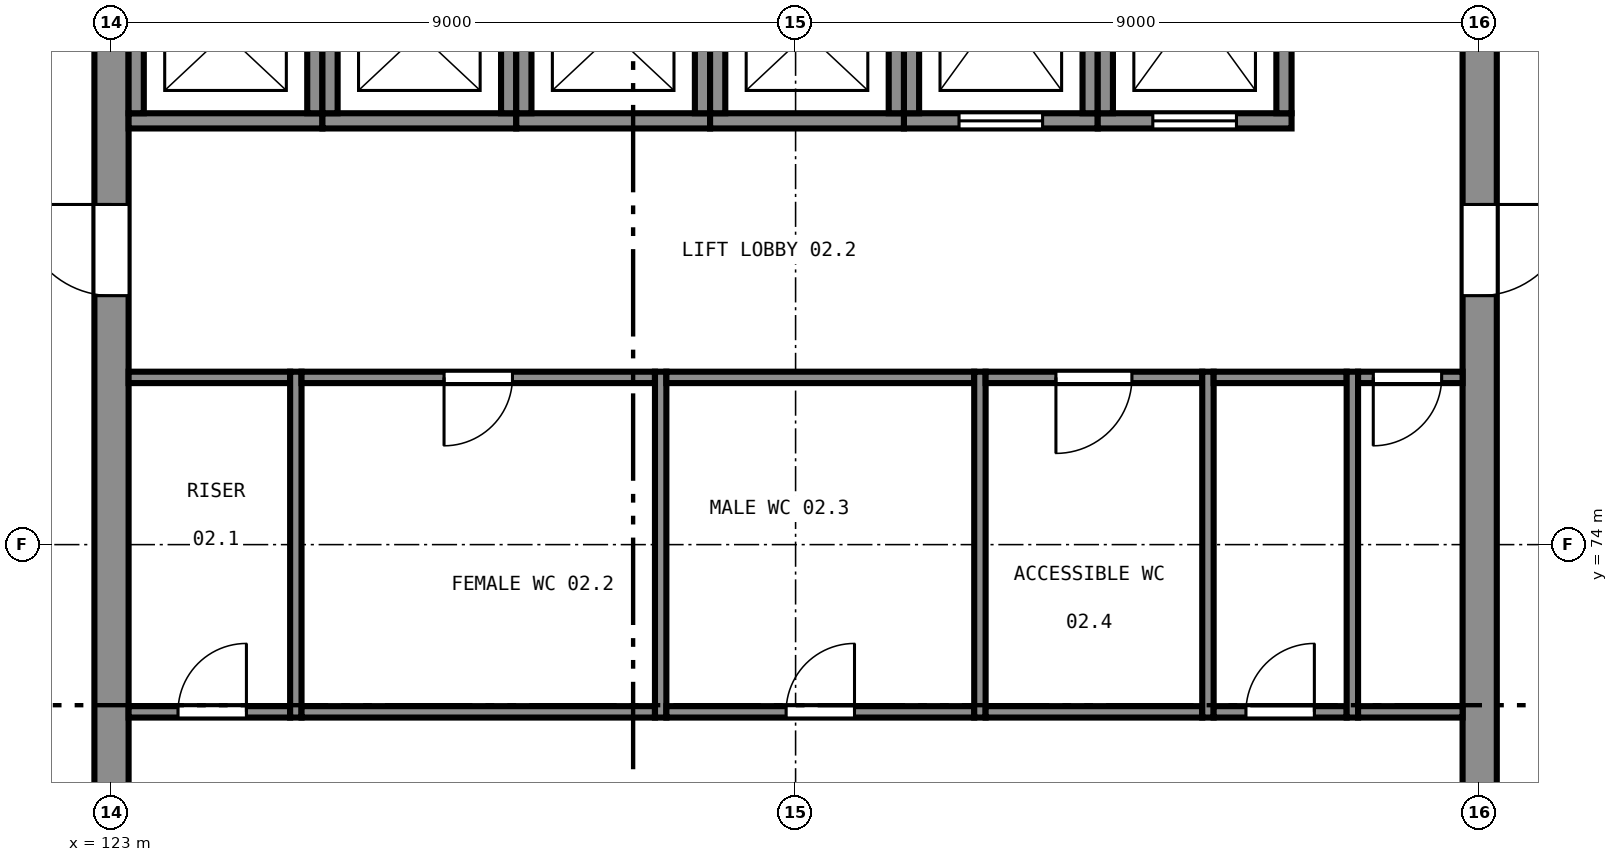
"""IFC4 building model, lengths in metres.
Left out: names, types, materials, properties, quantities, classifications, styles, units other than length and angle.
Written with IfcOpenShell. Run it as: python <this file> out.ifc"""

import sys

from ifc_helpers import new_model, si_unit, direction, frame, frame_2d, origin, place, context, subcontext, project, spatial, rectangle, extrude, element, fill, save


model = new_model("IFC4")
c1 = context("Model", 3, precision=1e-05, world=origin(), true_north=direction((0.0, 1.0)))
c2 = subcontext(c1, "Body", "Model", "MODEL_VIEW")
j1 = project(units=[si_unit("LENGTHUNIT", "METRE"), si_unit("PLANEANGLEUNIT", "RADIAN")], contexts=[c1])
p1 = place(None, origin())
s1 = spatial("IfcSite", under=j1, at=p1, CompositionType="ELEMENT")
p2 = place(p1, origin())
s2 = spatial("IfcBuilding", under=s1, at=p2, CompositionType="ELEMENT")
p3 = place(p2, frame((0.0, 0.0, 9.5)))
s3 = spatial("IfcBuildingStorey", under=s2, at=p3, CompositionType="ELEMENT", Elevation=9.5)
p4 = place(p3, frame((141.0, 65.225, 0.0), z_axis=(0.0, 0.0, 1.0), x_axis=(0.0, 1.0, 0.0)))
e1 = element("IfcWall", 1, at=p4, inside=s3, PredefinedType="SHEAR", context=c2, shape_type="SweptSolid", body=[
    extrude(rectangle(XDim=17.55, YDim=0.45, at=frame_2d((8.775, 0.0))), origin(), (0.0, 0.0, 1.0), 4.0),
])
p5 = place(p4, frame((4.3, 0.0, 0.0)))
e2 = element("IfcOpeningElement", 2, at=p5, cuts=e1, PredefinedType="OPENING", context=c2, shape_type="SweptSolid", body=[
    extrude(rectangle(XDim=1.2, YDim=2.1, at=frame_2d((0.6, 1.05))), frame((0.0, 0.235, 0.0), z_axis=(0.0, -1.0, 0.0), x_axis=(1.0, 0.0, 0.0)), (0.0, 0.0, 1.0), 0.47),
])
p6 = place(p4, frame((12.05, 0.0, 0.0)))
e3 = element("IfcOpeningElement", 3, at=p6, cuts=e1, PredefinedType="OPENING", context=c2, shape_type="SweptSolid", body=[
    extrude(rectangle(XDim=1.2, YDim=2.1, at=frame_2d((0.6, 1.05))), frame((0.0, 0.235, 0.0), z_axis=(0.0, -1.0, 0.0), x_axis=(1.0, 0.0, 0.0)), (0.0, 0.0, 1.0), 0.47),
])
p7 = place(p3, frame((123.0, 82.775, 0.0), z_axis=(0.0, 0.0, 1.0), x_axis=(0.0, -1.0, 0.0)))
e4 = element("IfcWall", 4, at=p7, inside=s3, PredefinedType="SHEAR", context=c2, shape_type="SweptSolid", body=[
    extrude(rectangle(XDim=17.55, YDim=0.45, at=frame_2d((8.775, 0.0))), origin(), (0.0, 0.0, 1.0), 4.0),
])
p8 = place(p7, frame((12.05, 0.0, 0.0)))
e5 = element("IfcOpeningElement", 5, at=p8, cuts=e4, PredefinedType="OPENING", context=c2, shape_type="SweptSolid", body=[
    extrude(rectangle(XDim=1.2, YDim=2.1, at=frame_2d((0.6, 1.05))), frame((0.0, 0.235, 0.0), z_axis=(0.0, -1.0, 0.0), x_axis=(1.0, 0.0, 0.0)), (0.0, 0.0, 1.0), 0.47),
])
p9 = place(p7, frame((4.3, 0.0, 0.0)))
e6 = element("IfcOpeningElement", 6, at=p9, cuts=e4, PredefinedType="OPENING", context=c2, shape_type="SweptSolid", body=[
    extrude(rectangle(XDim=1.2, YDim=2.1, at=frame_2d((0.6, 1.05))), frame((0.0, 0.235, 0.0), z_axis=(0.0, -1.0, 0.0), x_axis=(1.0, 0.0, 0.0)), (0.0, 0.0, 1.0), 0.47),
])
p10 = place(p3, frame((123.225, 79.575, 0.0), z_axis=(0.0, 0.0, 1.0), x_axis=(1.0, 0.0, 0.0)))
e7 = element("IfcWall", 7, at=p10, inside=s3, PredefinedType="SHEAR", context=c2, shape_type="SweptSolid", body=[
    extrude(rectangle(XDim=2.55, YDim=0.2, at=frame_2d((1.275, 0.0))), origin(), (0.0, 0.0, 1.0), 4.0),
])
for number, where, z_axis, x_axis in (
    (8, (125.675, 79.675, 0.0), (0.0, 0.0, 1.0), (0.0, 1.0, 0.0)),
    (9, (123.325, 81.775, 0.0), (0.0, 0.0, 1.0), (0.0, -1.0, 0.0)),
):
    element("IfcWall", number, at=place(p3, frame(where, z_axis=z_axis, x_axis=x_axis)), inside=s3, PredefinedType="SHEAR", context=c2, shape_type="SweptSolid", body=[
        extrude(rectangle(XDim=2.1, YDim=0.2, at=frame_2d((1.05, 0.0))), origin(), (0.0, 0.0, 1.0), 4.0),
    ])
p11 = place(p3, frame((125.775, 79.575, 0.0), z_axis=(0.0, 0.0, 1.0), x_axis=(1.0, 0.0, 0.0)))
e10 = element("IfcWall", 10, at=p11, inside=s3, PredefinedType="SHEAR", context=c2, shape_type="SweptSolid", body=[
    extrude(rectangle(XDim=2.55, YDim=0.2, at=frame_2d((1.275, 0.0))), origin(), (0.0, 0.0, 1.0), 4.0),
])
for number, where, z_axis, x_axis in (
    (11, (128.225, 79.675, 0.0), (0.0, 0.0, 1.0), (0.0, 1.0, 0.0)),
    (12, (125.875, 81.775, 0.0), (0.0, 0.0, 1.0), (0.0, -1.0, 0.0)),
):
    element("IfcWall", number, at=place(p3, frame(where, z_axis=z_axis, x_axis=x_axis)), inside=s3, PredefinedType="SHEAR", context=c2, shape_type="SweptSolid", body=[
        extrude(rectangle(XDim=2.1, YDim=0.2, at=frame_2d((1.05, 0.0))), origin(), (0.0, 0.0, 1.0), 4.0),
    ])
p12 = place(p3, frame((128.325, 79.575, 0.0), z_axis=(0.0, 0.0, 1.0), x_axis=(1.0, 0.0, 0.0)))
e13 = element("IfcWall", 13, at=p12, inside=s3, PredefinedType="SHEAR", context=c2, shape_type="SweptSolid", body=[
    extrude(rectangle(XDim=2.55, YDim=0.2, at=frame_2d((1.275, 0.0))), origin(), (0.0, 0.0, 1.0), 4.0),
])
for number, where, z_axis, x_axis in (
    (14, (130.775, 79.675, 0.0), (0.0, 0.0, 1.0), (0.0, 1.0, 0.0)),
    (15, (128.425, 81.775, 0.0), (0.0, 0.0, 1.0), (0.0, -1.0, 0.0)),
):
    element("IfcWall", number, at=place(p3, frame(where, z_axis=z_axis, x_axis=x_axis)), inside=s3, PredefinedType="SHEAR", context=c2, shape_type="SweptSolid", body=[
        extrude(rectangle(XDim=2.1, YDim=0.2, at=frame_2d((1.05, 0.0))), origin(), (0.0, 0.0, 1.0), 4.0),
    ])
p13 = place(p3, frame((130.875, 79.575, 0.0), z_axis=(0.0, 0.0, 1.0), x_axis=(1.0, 0.0, 0.0)))
e16 = element("IfcWall", 16, at=p13, inside=s3, PredefinedType="SHEAR", context=c2, shape_type="SweptSolid", body=[
    extrude(rectangle(XDim=2.55, YDim=0.2, at=frame_2d((1.275, 0.0))), origin(), (0.0, 0.0, 1.0), 4.0),
])
for number, where, z_axis, x_axis in (
    (17, (133.325, 79.675, 0.0), (0.0, 0.0, 1.0), (0.0, 1.0, 0.0)),
    (18, (130.975, 81.775, 0.0), (0.0, 0.0, 1.0), (0.0, -1.0, 0.0)),
):
    element("IfcWall", number, at=place(p3, frame(where, z_axis=z_axis, x_axis=x_axis)), inside=s3, PredefinedType="SHEAR", context=c2, shape_type="SweptSolid", body=[
        extrude(rectangle(XDim=2.1, YDim=0.2, at=frame_2d((1.05, 0.0))), origin(), (0.0, 0.0, 1.0), 4.0),
    ])
p14 = place(p3, frame((133.425, 79.575, 0.0), z_axis=(0.0, 0.0, 1.0), x_axis=(1.0, 0.0, 0.0)))
e19 = element("IfcWall", 19, at=p14, inside=s3, PredefinedType="SHEAR", context=c2, shape_type="SweptSolid", body=[
    extrude(rectangle(XDim=2.55, YDim=0.2, at=frame_2d((1.275, 0.0))), origin(), (0.0, 0.0, 1.0), 4.0),
])
p15 = place(p14, frame((0.725, 0.0, 0.0)))
e20 = element("IfcOpeningElement", 20, at=p15, cuts=e19, PredefinedType="OPENING", context=c2, shape_type="SweptSolid", body=[
    extrude(rectangle(XDim=1.1, YDim=2.1, at=frame_2d((0.55, 1.05))), frame((0.0, 0.11, 0.0), z_axis=(0.0, -1.0, 0.0), x_axis=(1.0, 0.0, 0.0)), (0.0, 0.0, 1.0), 0.22),
])
for number, where, z_axis, x_axis in (
    (21, (135.875, 79.675, 0.0), (0.0, 0.0, 1.0), (0.0, 1.0, 0.0)),
    (22, (133.525, 82.475, 0.0), (0.0, 0.0, 1.0), (0.0, -1.0, 0.0)),
):
    element("IfcWall", number, at=place(p3, frame(where, z_axis=z_axis, x_axis=x_axis)), inside=s3, PredefinedType="SHEAR", context=c2, shape_type="SweptSolid", body=[
        extrude(rectangle(XDim=2.8, YDim=0.2, at=frame_2d((1.4, 0.0))), origin(), (0.0, 0.0, 1.0), 4.0),
    ])
p16 = place(p3, frame((135.975, 79.575, 0.0), z_axis=(0.0, 0.0, 1.0), x_axis=(1.0, 0.0, 0.0)))
e23 = element("IfcWall", 23, at=p16, inside=s3, PredefinedType="SHEAR", context=c2, shape_type="SweptSolid", body=[
    extrude(rectangle(XDim=2.55, YDim=0.2, at=frame_2d((1.275, 0.0))), origin(), (0.0, 0.0, 1.0), 4.0),
])
p17 = place(p16, frame((0.725, 0.0, 0.0)))
e24 = element("IfcOpeningElement", 24, at=p17, cuts=e23, PredefinedType="OPENING", context=c2, shape_type="SweptSolid", body=[
    extrude(rectangle(XDim=1.1, YDim=2.1, at=frame_2d((0.55, 1.05))), frame((0.0, 0.11, 0.0), z_axis=(0.0, -1.0, 0.0), x_axis=(1.0, 0.0, 0.0)), (0.0, 0.0, 1.0), 0.22),
])
for number, where, z_axis, x_axis in (
    (25, (138.425, 79.675, 0.0), (0.0, 0.0, 1.0), (0.0, 1.0, 0.0)),
    (26, (136.075, 82.475, 0.0), (0.0, 0.0, 1.0), (0.0, -1.0, 0.0)),
):
    element("IfcWall", number, at=place(p3, frame(where, z_axis=z_axis, x_axis=x_axis)), inside=s3, PredefinedType="SHEAR", context=c2, shape_type="SweptSolid", body=[
        extrude(rectangle(XDim=2.8, YDim=0.2, at=frame_2d((1.4, 0.0))), origin(), (0.0, 0.0, 1.0), 4.0),
    ])
p18 = place(p3, frame((125.425, 71.725, 0.0), z_axis=(0.0, 0.0, 1.0), x_axis=(0.0, 1.0, 0.0)))
e27 = element("IfcWall", 27, at=p18, inside=s3, PredefinedType="PARTITIONING", context=c2, shape_type="SweptSolid", body=[
    extrude(rectangle(XDim=4.55, YDim=0.15, at=frame_2d((2.275, 0.0))), origin(), (0.0, 0.0, 1.0), 3.75),
])
p19 = place(p3, frame((123.225, 71.8, 0.0), z_axis=(0.0, 0.0, 1.0), x_axis=(1.0, 0.0, 0.0)))
e28 = element("IfcWall", 28, at=p19, inside=s3, PredefinedType="PARTITIONING", context=c2, shape_type="SweptSolid", body=[
    extrude(rectangle(XDim=2.125, YDim=0.15, at=frame_2d((1.062, 0.0))), origin(), (0.0, 0.0, 1.0), 3.75),
])
p20 = place(p19, frame((0.65, 0.0, 0.0)))
e29 = element("IfcOpeningElement", 29, at=p20, cuts=e28, PredefinedType="OPENING", context=c2, shape_type="SweptSolid", body=[
    extrude(rectangle(XDim=0.9, YDim=2.1, at=frame_2d((0.45, 1.05))), frame((0.0, 0.085, 0.0), z_axis=(0.0, -1.0, 0.0), x_axis=(1.0, 0.0, 0.0)), (0.0, 0.0, 1.0), 0.17),
])
p21 = place(p3, frame((123.225, 76.2, 0.0), z_axis=(0.0, 0.0, 1.0), x_axis=(1.0, 0.0, 0.0)))
e30 = element("IfcWall", 30, at=p21, inside=s3, PredefinedType="PARTITIONING", context=c2, shape_type="SweptSolid", body=[
    extrude(rectangle(XDim=2.125, YDim=0.15, at=frame_2d((1.062, 0.0))), origin(), (0.0, 0.0, 1.0), 3.75),
])
p22 = place(p3, frame((130.225, 71.725, 0.0), z_axis=(0.0, 0.0, 1.0), x_axis=(0.0, 1.0, 0.0)))
e31 = element("IfcWall", 31, at=p22, inside=s3, PredefinedType="PARTITIONING", context=c2, shape_type="SweptSolid", body=[
    extrude(rectangle(XDim=4.55, YDim=0.15, at=frame_2d((2.275, 0.0))), origin(), (0.0, 0.0, 1.0), 3.75),
])
p23 = place(p3, frame((125.5, 71.8, 0.0), z_axis=(0.0, 0.0, 1.0), x_axis=(1.0, 0.0, 0.0)))
e32 = element("IfcWall", 32, at=p23, inside=s3, PredefinedType="PARTITIONING", context=c2, shape_type="SweptSolid", body=[
    extrude(rectangle(XDim=4.65, YDim=0.15, at=frame_2d((2.325, 0.0))), origin(), (0.0, 0.0, 1.0), 3.75),
])
p24 = place(p3, frame((125.5, 76.2, 0.0), z_axis=(0.0, 0.0, 1.0), x_axis=(1.0, 0.0, 0.0)))
e33 = element("IfcWall", 33, at=p24, inside=s3, PredefinedType="PARTITIONING", context=c2, shape_type="SweptSolid", body=[
    extrude(rectangle(XDim=4.65, YDim=0.15, at=frame_2d((2.325, 0.0))), origin(), (0.0, 0.0, 1.0), 3.75),
])
p25 = place(p24, frame((1.875, 0.0, 0.0)))
e34 = element("IfcOpeningElement", 34, at=p25, cuts=e33, PredefinedType="OPENING", context=c2, shape_type="SweptSolid", body=[
    extrude(rectangle(XDim=0.9, YDim=2.1, at=frame_2d((0.45, 1.05))), frame((0.0, 0.085, 0.0), z_axis=(0.0, -1.0, 0.0), x_axis=(1.0, 0.0, 0.0)), (0.0, 0.0, 1.0), 0.17),
])
p26 = place(p3, frame((134.425, 71.725, 0.0), z_axis=(0.0, 0.0, 1.0), x_axis=(0.0, 1.0, 0.0)))
e35 = element("IfcWall", 35, at=p26, inside=s3, PredefinedType="PARTITIONING", context=c2, shape_type="SweptSolid", body=[
    extrude(rectangle(XDim=4.55, YDim=0.15, at=frame_2d((2.275, 0.0))), origin(), (0.0, 0.0, 1.0), 3.75),
])
p27 = place(p3, frame((130.3, 71.8, 0.0), z_axis=(0.0, 0.0, 1.0), x_axis=(1.0, 0.0, 0.0)))
e36 = element("IfcWall", 36, at=p27, inside=s3, PredefinedType="PARTITIONING", context=c2, shape_type="SweptSolid", body=[
    extrude(rectangle(XDim=4.05, YDim=0.15, at=frame_2d((2.025, 0.0))), origin(), (0.0, 0.0, 1.0), 3.75),
])
p28 = place(p27, frame((1.575, 0.0, 0.0)))
e37 = element("IfcOpeningElement", 37, at=p28, cuts=e36, PredefinedType="OPENING", context=c2, shape_type="SweptSolid", body=[
    extrude(rectangle(XDim=0.9, YDim=2.1, at=frame_2d((0.45, 1.05))), frame((0.0, 0.085, 0.0), z_axis=(0.0, -1.0, 0.0), x_axis=(1.0, 0.0, 0.0)), (0.0, 0.0, 1.0), 0.17),
])
p29 = place(p3, frame((130.3, 76.2, 0.0), z_axis=(0.0, 0.0, 1.0), x_axis=(1.0, 0.0, 0.0)))
e38 = element("IfcWall", 38, at=p29, inside=s3, PredefinedType="PARTITIONING", context=c2, shape_type="SweptSolid", body=[
    extrude(rectangle(XDim=4.05, YDim=0.15, at=frame_2d((2.025, 0.0))), origin(), (0.0, 0.0, 1.0), 3.75),
])
p30 = place(p3, frame((137.425, 71.725, 0.0), z_axis=(0.0, 0.0, 1.0), x_axis=(0.0, 1.0, 0.0)))
e39 = element("IfcWall", 39, at=p30, inside=s3, PredefinedType="PARTITIONING", context=c2, shape_type="SweptSolid", body=[
    extrude(rectangle(XDim=4.55, YDim=0.15, at=frame_2d((2.275, 0.0))), origin(), (0.0, 0.0, 1.0), 3.75),
])
p31 = place(p3, frame((134.5, 71.8, 0.0), z_axis=(0.0, 0.0, 1.0), x_axis=(1.0, 0.0, 0.0)))
e40 = element("IfcWall", 40, at=p31, inside=s3, PredefinedType="PARTITIONING", context=c2, shape_type="SweptSolid", body=[
    extrude(rectangle(XDim=2.85, YDim=0.15, at=frame_2d((1.425, 0.0))), origin(), (0.0, 0.0, 1.0), 3.75),
])
p32 = place(p3, frame((134.5, 76.2, 0.0), z_axis=(0.0, 0.0, 1.0), x_axis=(1.0, 0.0, 0.0)))
e41 = element("IfcWall", 41, at=p32, inside=s3, PredefinedType="PARTITIONING", context=c2, shape_type="SweptSolid", body=[
    extrude(rectangle(XDim=2.85, YDim=0.15, at=frame_2d((1.425, 0.0))), origin(), (0.0, 0.0, 1.0), 3.75),
])
p33 = place(p32, frame((0.925, 0.0, 0.0)))
e42 = element("IfcOpeningElement", 42, at=p33, cuts=e41, PredefinedType="OPENING", context=c2, shape_type="SweptSolid", body=[
    extrude(rectangle(XDim=1.0, YDim=2.1, at=frame_2d((0.5, 1.05))), frame((0.0, 0.085, 0.0), z_axis=(0.0, -1.0, 0.0), x_axis=(1.0, 0.0, 0.0)), (0.0, 0.0, 1.0), 0.17),
])
p34 = place(p3, frame((139.325, 71.725, 0.0), z_axis=(0.0, 0.0, 1.0), x_axis=(0.0, 1.0, 0.0)))
e43 = element("IfcWall", 43, at=p34, inside=s3, PredefinedType="PARTITIONING", context=c2, shape_type="SweptSolid", body=[
    extrude(rectangle(XDim=4.55, YDim=0.15, at=frame_2d((2.275, 0.0))), origin(), (0.0, 0.0, 1.0), 3.75),
])
p35 = place(p3, frame((137.5, 71.8, 0.0), z_axis=(0.0, 0.0, 1.0), x_axis=(1.0, 0.0, 0.0)))
e44 = element("IfcWall", 44, at=p35, inside=s3, PredefinedType="PARTITIONING", context=c2, shape_type="SweptSolid", body=[
    extrude(rectangle(XDim=1.75, YDim=0.15, at=frame_2d((0.875, 0.0))), origin(), (0.0, 0.0, 1.0), 3.75),
])
p36 = place(p35, frame((0.425, 0.0, 0.0)))
e45 = element("IfcOpeningElement", 45, at=p36, cuts=e44, PredefinedType="OPENING", context=c2, shape_type="SweptSolid", body=[
    extrude(rectangle(XDim=0.9, YDim=2.1, at=frame_2d((0.45, 1.05))), frame((0.0, 0.085, 0.0), z_axis=(0.0, -1.0, 0.0), x_axis=(1.0, 0.0, 0.0)), (0.0, 0.0, 1.0), 0.17),
])
p37 = place(p3, frame((137.5, 76.2, 0.0), z_axis=(0.0, 0.0, 1.0), x_axis=(1.0, 0.0, 0.0)))
e46 = element("IfcWall", 46, at=p37, inside=s3, PredefinedType="PARTITIONING", context=c2, shape_type="SweptSolid", body=[
    extrude(rectangle(XDim=1.75, YDim=0.15, at=frame_2d((0.875, 0.0))), origin(), (0.0, 0.0, 1.0), 3.75),
])
p38 = place(p3, frame((139.4, 71.8, 0.0), z_axis=(0.0, 0.0, 1.0), x_axis=(1.0, 0.0, 0.0)))
e47 = element("IfcWall", 47, at=p38, inside=s3, PredefinedType="PARTITIONING", context=c2, shape_type="SweptSolid", body=[
    extrude(rectangle(XDim=1.375, YDim=0.15, at=frame_2d((0.688, 0.0))), origin(), (0.0, 0.0, 1.0), 3.75),
])
p39 = place(p3, frame((139.4, 76.2, 0.0), z_axis=(0.0, 0.0, 1.0), x_axis=(1.0, 0.0, 0.0)))
e48 = element("IfcWall", 48, at=p39, inside=s3, PredefinedType="PARTITIONING", context=c2, shape_type="SweptSolid", body=[
    extrude(rectangle(XDim=1.375, YDim=0.15, at=frame_2d((0.688, 0.0))), origin(), (0.0, 0.0, 1.0), 3.75),
])
p40 = place(p39, frame((0.2, 0.0, 0.0)))
e49 = element("IfcOpeningElement", 49, at=p40, cuts=e48, PredefinedType="OPENING", context=c2, shape_type="SweptSolid", body=[
    extrude(rectangle(XDim=0.9, YDim=2.1, at=frame_2d((0.45, 1.05))), frame((0.0, 0.085, 0.0), z_axis=(0.0, -1.0, 0.0), x_axis=(1.0, 0.0, 0.0)), (0.0, 0.0, 1.0), 0.17),
])
p41 = place(p15, origin())
e50 = element("IfcDoor", 50, at=p41, inside=s3, OperationType="SLIDING_TO_LEFT", PredefinedType="DOOR", context=c2, shape_type="SweptSolid", body=[
    extrude(rectangle(XDim=1.1, YDim=2.1, at=frame_2d((0.55, 1.05))), frame((0.0, 0.025, 0.0), z_axis=(0.0, -1.0, 0.0), x_axis=(1.0, 0.0, 0.0)), (0.0, 0.0, 1.0), 0.05),
])
fill(e20, e50)
p42 = place(p17, origin())
e51 = element("IfcDoor", 51, at=p42, inside=s3, OperationType="SLIDING_TO_LEFT", PredefinedType="DOOR", context=c2, shape_type="SweptSolid", body=[
    extrude(rectangle(XDim=1.1, YDim=2.1, at=frame_2d((0.55, 1.05))), frame((0.0, 0.025, 0.0), z_axis=(0.0, -1.0, 0.0), x_axis=(1.0, 0.0, 0.0)), (0.0, 0.0, 1.0), 0.05),
])
fill(e24, e51)
p43 = place(p9, frame((1.2, 0.0, 0.0), z_axis=(0.0, 0.0, 1.0), x_axis=(-1.0, 0.0, 0.0)))
e52 = element("IfcDoor", 52, at=p43, inside=s3, OperationType="SINGLE_SWING_LEFT", PredefinedType="DOOR", context=c2, shape_type="SweptSolid", body=[
    extrude(rectangle(XDim=1.2, YDim=2.1, at=frame_2d((0.6, 1.05))), frame((0.0, 0.025, 0.0), z_axis=(0.0, -1.0, 0.0), x_axis=(1.0, 0.0, 0.0)), (0.0, 0.0, 1.0), 0.05),
])
fill(e6, e52)
p44 = place(p6, frame((1.2, 0.0, 0.0), z_axis=(0.0, 0.0, 1.0), x_axis=(-1.0, 0.0, 0.0)))
e53 = element("IfcDoor", 53, at=p44, inside=s3, OperationType="SINGLE_SWING_RIGHT", PredefinedType="DOOR", context=c2, shape_type="SweptSolid", body=[
    extrude(rectangle(XDim=1.2, YDim=2.1, at=frame_2d((0.6, 1.05))), frame((0.0, 0.025, 0.0), z_axis=(0.0, -1.0, 0.0), x_axis=(1.0, 0.0, 0.0)), (0.0, 0.0, 1.0), 0.05),
])
fill(e3, e53)
p45 = place(p20, origin())
e54 = element("IfcDoor", 54, at=p45, inside=s3, OperationType="SINGLE_SWING_LEFT", PredefinedType="DOOR", context=c2, shape_type="SweptSolid", body=[
    extrude(rectangle(XDim=0.9, YDim=2.1, at=frame_2d((0.45, 1.05))), frame((0.0, 0.025, 0.0), z_axis=(0.0, -1.0, 0.0), x_axis=(1.0, 0.0, 0.0)), (0.0, 0.0, 1.0), 0.05),
])
fill(e29, e54)
p46 = place(p25, frame((0.9, 0.0, 0.0), z_axis=(0.0, 0.0, 1.0), x_axis=(-1.0, 0.0, 0.0)))
e55 = element("IfcDoor", 55, at=p46, inside=s3, OperationType="SINGLE_SWING_LEFT", PredefinedType="DOOR", context=c2, shape_type="SweptSolid", body=[
    extrude(rectangle(XDim=0.9, YDim=2.1, at=frame_2d((0.45, 1.05))), frame((0.0, 0.025, 0.0), z_axis=(0.0, -1.0, 0.0), x_axis=(1.0, 0.0, 0.0)), (0.0, 0.0, 1.0), 0.05),
])
fill(e34, e55)
p47 = place(p28, origin())
e56 = element("IfcDoor", 56, at=p47, inside=s3, OperationType="SINGLE_SWING_LEFT", PredefinedType="DOOR", context=c2, shape_type="SweptSolid", body=[
    extrude(rectangle(XDim=0.9, YDim=2.1, at=frame_2d((0.45, 1.05))), frame((0.0, 0.025, 0.0), z_axis=(0.0, -1.0, 0.0), x_axis=(1.0, 0.0, 0.0)), (0.0, 0.0, 1.0), 0.05),
])
fill(e37, e56)
p48 = place(p33, frame((1.0, 0.0, 0.0), z_axis=(0.0, 0.0, 1.0), x_axis=(-1.0, 0.0, 0.0)))
e57 = element("IfcDoor", 57, at=p48, inside=s3, OperationType="SINGLE_SWING_LEFT", PredefinedType="DOOR", context=c2, shape_type="SweptSolid", body=[
    extrude(rectangle(XDim=1.0, YDim=2.1, at=frame_2d((0.5, 1.05))), frame((0.0, 0.025, 0.0), z_axis=(0.0, -1.0, 0.0), x_axis=(1.0, 0.0, 0.0)), (0.0, 0.0, 1.0), 0.05),
])
fill(e42, e57)
p49 = place(p36, origin())
e58 = element("IfcDoor", 58, at=p49, inside=s3, OperationType="SINGLE_SWING_LEFT", PredefinedType="DOOR", context=c2, shape_type="SweptSolid", body=[
    extrude(rectangle(XDim=0.9, YDim=2.1, at=frame_2d((0.45, 1.05))), frame((0.0, 0.025, 0.0), z_axis=(0.0, -1.0, 0.0), x_axis=(1.0, 0.0, 0.0)), (0.0, 0.0, 1.0), 0.05),
])
fill(e45, e58)
p50 = place(p40, frame((0.9, 0.0, 0.0), z_axis=(0.0, 0.0, 1.0), x_axis=(-1.0, 0.0, 0.0)))
e59 = element("IfcDoor", 59, at=p50, inside=s3, OperationType="SINGLE_SWING_LEFT", PredefinedType="DOOR", context=c2, shape_type="SweptSolid", body=[
    extrude(rectangle(XDim=0.9, YDim=2.1, at=frame_2d((0.45, 1.05))), frame((0.0, 0.025, 0.0), z_axis=(0.0, -1.0, 0.0), x_axis=(1.0, 0.0, 0.0)), (0.0, 0.0, 1.0), 0.05),
])
fill(e49, e59)
save(model, sys.argv[1])
